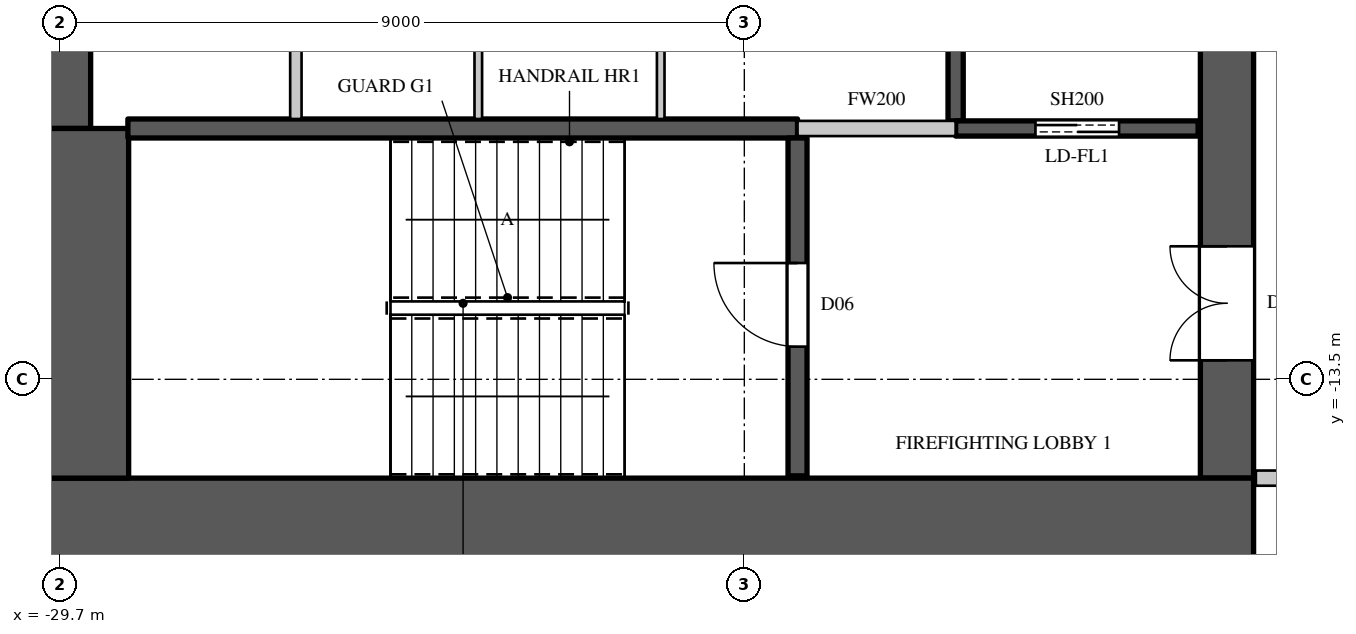
"""IFC4 building model, lengths in metres.
Left out: names, types, materials, properties, quantities, classifications, styles, units other than length and angle.
Written with IfcOpenShell. Run it as: python <this file> out.ifc"""

import sys

from ifc_helpers import new_model, si_unit, direction, frame, frame_2d, origin, place, context, subcontext, project, spatial, rectangle, extrude, element, fill, save


model = new_model("IFC4")
c1 = context("Model", 3, precision=1e-05, world=origin(), true_north=direction((0.0, 1.0)))
c2 = subcontext(c1, "Body", "Model", "MODEL_VIEW")
j1 = project(units=[si_unit("LENGTHUNIT", "METRE"), si_unit("PLANEANGLEUNIT", "RADIAN")], contexts=[c1])
p1 = place(None, origin())
s1 = spatial("IfcSite", under=j1, at=p1, CompositionType="ELEMENT")
p2 = place(p1, origin())
s2 = spatial("IfcBuilding", under=s1, at=p2, CompositionType="ELEMENT")
p3 = place(p2, frame((0.0, 0.0, 251.6)))
s3 = spatial("IfcBuildingStorey", under=s2, at=p3, CompositionType="ELEMENT", Elevation=251.6)
p4 = place(p3, frame((-30.0, -15.4, 0.0), z_axis=(0.0, 0.0, 1.0), x_axis=(1.0, 0.0, 0.0)))
e1 = element("IfcWall", 1, at=p4, inside=s3, PredefinedType="SHEAR", context=c2, shape_type="SweptSolid", body=[
    extrude(rectangle(XDim=16.0, YDim=1.2, at=frame_2d((8.0, 0.0))), origin(), (0.0, 0.0, 1.0), 4.1),
])
p5 = place(p3, frame((-14.35, -14.8, 0.0), z_axis=(0.0, 0.0, 1.0), x_axis=(0.0, 1.0, 0.0)))
e2 = element("IfcWall", 2, at=p5, inside=s3, PredefinedType="SHEAR", context=c2, shape_type="SweptSolid", body=[
    extrude(rectangle(XDim=29.6, YDim=0.7, at=frame_2d((14.8, 0.0))), origin(), (0.0, 0.0, 1.0), 4.1),
])
p6 = place(p5, frame((1.55, 0.0, 0.0)))
e3 = element("IfcOpeningElement", 3, at=p6, cuts=e2, PredefinedType="OPENING", context=c2, shape_type="SweptSolid", body=[
    extrude(rectangle(XDim=1.5, YDim=2.4, at=frame_2d((0.75, 1.2))), frame((0.0, 0.36, 0.0), z_axis=(0.0, -1.0, 0.0), x_axis=(1.0, 0.0, 0.0)), (0.0, 0.0, 1.0), 0.72),
])
p7 = place(p5, frame((26.55, 0.0, 0.0)))
e4 = element("IfcOpeningElement", 4, at=p7, cuts=e2, PredefinedType="OPENING", context=c2, shape_type="SweptSolid", body=[
    extrude(rectangle(XDim=1.5, YDim=2.4, at=frame_2d((0.75, 1.2))), frame((0.0, 0.36, 0.0), z_axis=(0.0, -1.0, 0.0), x_axis=(1.0, 0.0, 0.0)), (0.0, 0.0, 1.0), 0.72),
])
p8 = place(p5, frame((8.45, 0.0, 0.0)))
e5 = element("IfcOpeningElement", 5, at=p8, cuts=e2, PredefinedType="OPENING", context=c2, shape_type="SweptSolid", body=[
    extrude(rectangle(XDim=1.5, YDim=2.4, at=frame_2d((0.75, 1.2))), frame((0.0, 0.36, 0.0), z_axis=(0.0, -1.0, 0.0), x_axis=(1.0, 0.0, 0.0)), (0.0, 0.0, 1.0), 0.72),
])
p9 = place(p5, frame((19.65, 0.0, 0.0)))
e6 = element("IfcOpeningElement", 6, at=p9, cuts=e2, PredefinedType="OPENING", context=c2, shape_type="SweptSolid", body=[
    extrude(rectangle(XDim=1.5, YDim=2.4, at=frame_2d((0.75, 1.2))), frame((0.0, 0.36, 0.0), z_axis=(0.0, -1.0, 0.0), x_axis=(1.0, 0.0, 0.0)), (0.0, 0.0, 1.0), 0.72),
])
p10 = place(p5, frame((14.5, 0.0, 0.0)))
e7 = element("IfcOpeningElement", 7, at=p10, cuts=e2, PredefinedType="OPENING", context=c2, shape_type="SweptSolid", body=[
    extrude(rectangle(XDim=0.6, YDim=2.0, at=frame_2d((0.3, 1.0))), frame((0.0, 0.36, 0.0), z_axis=(0.0, -1.0, 0.0), x_axis=(1.0, 0.0, 0.0)), (0.0, 0.0, 1.0), 0.72),
])
p11 = place(p3, frame((-29.65, -10.2, 0.0), z_axis=(0.0, 0.0, 1.0), x_axis=(0.0, 1.0, 0.0)))
e8 = element("IfcWall", 8, at=p11, inside=s3, PredefinedType="SHEAR", context=c2, shape_type="SweptSolid", body=[
    extrude(rectangle(XDim=20.4, YDim=0.7, at=frame_2d((10.2, 0.0))), origin(), (0.0, 0.0, 1.0), 4.1),
])
p12 = place(p3, frame((-29.4, -14.8, 0.0), z_axis=(0.0, 0.0, 1.0), x_axis=(0.0, 1.0, 0.0)))
e9 = element("IfcWall", 9, at=p12, inside=s3, PredefinedType="SHEAR", context=c2, shape_type="SweptSolid", body=[
    extrude(rectangle(XDim=4.6, YDim=1.2, at=frame_2d((2.3, 0.0))), origin(), (0.0, 0.0, 1.0), 4.1),
])
p13 = place(p3, frame((-20.0, -10.2, 0.0), z_axis=(0.0, 0.0, 1.0), x_axis=(1.0, 0.0, 0.0)))
e10 = element("IfcWall", 10, at=p13, inside=s3, PredefinedType="PARTITIONING", context=c2, shape_type="SweptSolid", body=[
    extrude(rectangle(XDim=2.08, YDim=0.2, at=frame_2d((1.04, 0.0))), origin(), (0.0, 0.0, 1.0), 3.8),
])
p14 = place(p3, frame((-13.97, -14.8, 0.0), z_axis=(0.0, 0.0, 1.0), x_axis=(1.0, 0.0, 0.0)))
e11 = element("IfcWall", 11, at=p14, inside=s3, PredefinedType="PARTITIONING", context=c2, shape_type="SweptSolid", body=[
    extrude(rectangle(XDim=2.87, YDim=0.2, at=frame_2d((1.435, 0.0))), origin(), (0.0, 0.0, 1.0), 3.8),
])
p15 = place(p3, frame((-26.6, -10.075, 0.0), z_axis=(0.0, 0.0, 1.0), x_axis=(0.0, 1.0, 0.0)))
e12 = element("IfcWall", 12, at=p15, inside=s3, PredefinedType="PARTITIONING", context=c2, shape_type="SweptSolid", body=[
    extrude(rectangle(XDim=2.575, YDim=0.15, at=frame_2d((1.288, 0.0))), origin(), (0.0, 0.0, 1.0), 3.8),
])
p16 = place(p3, frame((-17.92, -10.1, 0.0), z_axis=(0.0, 0.0, 1.0), x_axis=(0.0, 1.0, 0.0)))
e13 = element("IfcWall", 13, at=p16, inside=s3, PredefinedType="SHEAR", context=c2, shape_type="SweptSolid", body=[
    extrude(rectangle(XDim=2.6, YDim=0.2, at=frame_2d((1.3, 0.0))), origin(), (0.0, 0.0, 1.0), 3.8),
])
p17 = place(p3, frame((-17.92, -10.2, 0.0), z_axis=(0.0, 0.0, 1.0), x_axis=(1.0, 0.0, 0.0)))
e14 = element("IfcWall", 14, at=p17, inside=s3, PredefinedType="SHEAR", context=c2, shape_type="SweptSolid", body=[
    extrude(rectangle(XDim=3.19, YDim=0.2, at=frame_2d((1.595, 0.0))), origin(), (0.0, 0.0, 1.0), 3.8),
])
p18 = place(p17, frame((1.05, 0.0, 0.0)))
e15 = element("IfcOpeningElement", 15, at=p18, cuts=e14, PredefinedType="OPENING", context=c2, shape_type="SweptSolid", body=[
    extrude(rectangle(XDim=1.1, YDim=2.2, at=frame_2d((0.55, 1.1))), frame((0.0, 0.11, 0.0), z_axis=(0.0, -1.0, 0.0), x_axis=(1.0, 0.0, 0.0)), (0.0, 0.0, 1.0), 0.22),
])
p19 = place(p3, frame((-28.81, -10.2, 0.0), z_axis=(0.0, 0.0, 1.0), x_axis=(1.0, 0.0, 0.0)))
e16 = element("IfcWall", 16, at=p19, inside=s3, PredefinedType="SHEAR", context=c2, shape_type="SweptSolid", body=[
    extrude(rectangle(XDim=8.81, YDim=0.25, at=frame_2d((4.405, 0.0))), origin(), (0.0, 0.0, 1.0), 3.8),
])
p20 = place(p3, frame((-20.0, -14.77, 0.0), z_axis=(0.0, 0.0, 1.0), x_axis=(0.0, 1.0, 0.0)))
e17 = element("IfcWall", 17, at=p20, inside=s3, PredefinedType="SHEAR", context=c2, shape_type="SweptSolid", body=[
    extrude(rectangle(XDim=4.445, YDim=0.25, at=frame_2d((2.223, 0.0))), origin(), (0.0, 0.0, 1.0), 3.8),
])
p21 = place(p20, frame((1.7, 0.0, 0.0)))
e18 = element("IfcOpeningElement", 18, at=p21, cuts=e17, PredefinedType="OPENING", context=c2, shape_type="SweptSolid", body=[
    extrude(rectangle(XDim=1.1, YDim=2.2, at=frame_2d((0.55, 1.1))), frame((0.0, 0.135, 0.0), z_axis=(0.0, -1.0, 0.0), x_axis=(1.0, 0.0, 0.0)), (0.0, 0.0, 1.0), 0.27),
])
for number, where, z_axis, x_axis in (
    (19, (-24.2, -10.075, 0.0), (0.0, 0.0, 1.0), (0.0, 1.0, 0.0)),
    (20, (-21.8, -10.075, 0.0), (0.0, 0.0, 1.0), (0.0, 1.0, 0.0)),
):
    element("IfcWall", number, at=place(p3, frame(where, z_axis=z_axis, x_axis=x_axis)), inside=s3, PredefinedType="PARTITIONING", context=c2, shape_type="SweptSolid", body=[
        extrude(rectangle(XDim=2.575, YDim=0.1, at=frame_2d((1.288, 0.0))), origin(), (0.0, 0.0, 1.0), 3.8),
    ])
p22 = place(p21, origin())
e21 = element("IfcDoor", 21, at=p22, inside=s3, OperationType="SINGLE_SWING_RIGHT", PredefinedType="DOOR", context=c2, shape_type="SweptSolid", body=[
    extrude(rectangle(XDim=1.1, YDim=2.2, at=frame_2d((0.55, 1.1))), frame((0.0, 0.025, 0.0), z_axis=(0.0, -1.0, 0.0), x_axis=(1.0, 0.0, 0.0)), (0.0, 0.0, 1.0), 0.05),
])
fill(e18, e21)
p23 = place(p18, origin())
e22 = element("IfcDoor", 22, at=p23, inside=s3, OperationType="DOUBLE_DOOR_SLIDING", PredefinedType="DOOR", context=c2, shape_type="SweptSolid", body=[
    extrude(rectangle(XDim=1.1, YDim=2.2, at=frame_2d((0.55, 1.1))), frame((0.0, 0.025, 0.0), z_axis=(0.0, -1.0, 0.0), x_axis=(1.0, 0.0, 0.0)), (0.0, 0.0, 1.0), 0.05),
])
fill(e15, e22)
p24 = place(p6, origin())
e23 = element("IfcDoor", 23, at=p24, inside=s3, OperationType="DOUBLE_DOOR_SINGLE_SWING", PredefinedType="DOOR", context=c2, shape_type="SweptSolid", body=[
    extrude(rectangle(XDim=1.5, YDim=2.4, at=frame_2d((0.75, 1.2))), frame((0.0, 0.345, 0.0), z_axis=(0.0, -1.0, 0.0), x_axis=(1.0, 0.0, 0.0)), (0.0, 0.0, 1.0), 0.05),
])
fill(e3, e23)
save(model, sys.argv[1])
